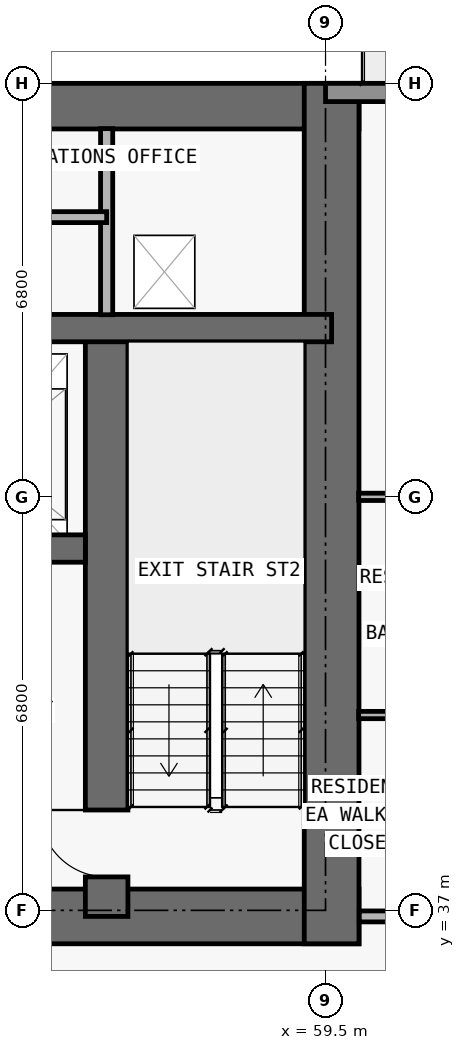
"""IFC4 building model, lengths in metres.
Left out: names, types, materials, properties, quantities, classifications, styles, units other than length and angle.
Written with IfcOpenShell. Run it as: python <this file> out.ifc"""

import sys

from ifc_helpers import new_model, si_unit, direction, frame, frame_2d, origin, place, context, subcontext, project, spatial, rectangle, extrude, element, fill, save


model = new_model("IFC4")
c1 = context("Model", 3, precision=1e-05, world=origin(), true_north=direction((0.0, 1.0)))
c2 = subcontext(c1, "Body", "Model", "MODEL_VIEW")
j1 = project(units=[si_unit("LENGTHUNIT", "METRE"), si_unit("PLANEANGLEUNIT", "RADIAN")], contexts=[c1])
p1 = place(None, origin())
s1 = spatial("IfcSite", under=j1, at=p1, CompositionType="ELEMENT")
p2 = place(p1, origin())
s2 = spatial("IfcBuilding", under=s1, at=p2, CompositionType="ELEMENT")
p3 = place(p2, frame((0.0, 0.0, 72.9)))
s3 = spatial("IfcBuildingStorey", under=s2, at=p3, CompositionType="ELEMENT", Elevation=72.9)
p4 = place(p3, frame((17.75, 36.9, 0.0), z_axis=(0.0, 0.0, 1.0), x_axis=(1.0, 0.0, 0.0)))
e1 = element("IfcWall", 1, at=p4, inside=s3, PredefinedType="SHEAR", context=c2, shape_type="SweptSolid", body=[
    extrude(rectangle(XDim=42.3, YDim=0.9, at=frame_2d((21.15, 0.0))), origin(), (0.0, 0.0, 1.0), 3.05),
])
p5 = place(p4, frame((14.55, 0.0, 0.0)))
e2 = element("IfcOpeningElement", 2, at=p5, cuts=e1, PredefinedType="OPENING", context=c2, shape_type="SweptSolid", body=[
    extrude(rectangle(XDim=1.1, YDim=2.15, at=frame_2d((0.55, 1.075))), frame((0.0, 0.46, 0.0), z_axis=(0.0, -1.0, 0.0), x_axis=(1.0, 0.0, 0.0)), (0.0, 0.0, 1.0), 0.92),
])
p6 = place(p4, frame((6.4, 0.0, 0.0)))
e3 = element("IfcOpeningElement", 3, at=p6, cuts=e1, PredefinedType="OPENING", context=c2, shape_type="SweptSolid", body=[
    extrude(rectangle(XDim=1.05, YDim=2.15, at=frame_2d((0.525, 1.075))), frame((0.0, 0.46, 0.0), z_axis=(0.0, -1.0, 0.0), x_axis=(1.0, 0.0, 0.0)), (0.0, 0.0, 1.0), 0.92),
])
p7 = place(p4, frame((34.9, 0.0, 0.0)))
e4 = element("IfcOpeningElement", 4, at=p7, cuts=e1, PredefinedType="OPENING", context=c2, shape_type="SweptSolid", body=[
    extrude(rectangle(XDim=1.05, YDim=2.15, at=frame_2d((0.525, 1.075))), frame((0.0, 0.46, 0.0), z_axis=(0.0, -1.0, 0.0), x_axis=(1.0, 0.0, 0.0)), (0.0, 0.0, 1.0), 0.92),
])
p8 = place(p4, frame((11.012, 0.0, 0.0)))
e5 = element("IfcOpeningElement", 5, at=p8, cuts=e1, PredefinedType="OPENING", context=c2, shape_type="SweptSolid", body=[
    extrude(rectangle(XDim=1.05, YDim=2.15, at=frame_2d((0.525, 1.075))), frame((0.0, 0.46, 0.0), z_axis=(0.0, -1.0, 0.0), x_axis=(1.0, 0.0, 0.0)), (0.0, 0.0, 1.0), 0.92),
])
p9 = place(p4, frame((24.25, 0.0, 0.0)))
e6 = element("IfcOpeningElement", 6, at=p9, cuts=e1, PredefinedType="OPENING", context=c2, shape_type="SweptSolid", body=[
    extrude(rectangle(XDim=1.05, YDim=2.15, at=frame_2d((0.525, 1.075))), frame((0.0, 0.46, 0.0), z_axis=(0.0, -1.0, 0.0), x_axis=(1.0, 0.0, 0.0)), (0.0, 0.0, 1.0), 0.92),
])
p10 = place(p3, frame((17.75, 50.225, 0.0), z_axis=(0.0, 0.0, 1.0), x_axis=(1.0, 0.0, 0.0)))
e7 = element("IfcWall", 7, at=p10, inside=s3, PredefinedType="SHEAR", context=c2, shape_type="SweptSolid", body=[
    extrude(rectangle(XDim=42.3, YDim=0.75, at=frame_2d((21.15, 0.0))), origin(), (0.0, 0.0, 1.0), 3.05),
])
p11 = place(p3, frame((59.6, 36.45, 0.0), z_axis=(0.0, 0.0, 1.0), x_axis=(0.0, 1.0, 0.0)))
e8 = element("IfcWall", 8, at=p11, inside=s3, PredefinedType="SHEAR", context=c2, shape_type="SweptSolid", body=[
    extrude(rectangle(XDim=14.15, YDim=0.9, at=frame_2d((7.075, 0.0))), origin(), (0.0, 0.0, 1.0), 3.05),
])
p12 = place(p3, frame((55.9, 36.9, 0.0), z_axis=(0.0, 0.0, 1.0), x_axis=(0.0, 1.0, 0.0)))
e9 = element("IfcWall", 9, at=p12, inside=s3, PredefinedType="SHEAR", context=c2, shape_type="SweptSolid", body=[
    extrude(rectangle(XDim=9.675, YDim=0.7, at=frame_2d((4.837, 0.0))), origin(), (0.0, 0.0, 1.0), 3.05),
])
p13 = place(p12, frame((0.65, 0.0, 0.0)))
e10 = element("IfcOpeningElement", 10, at=p13, cuts=e9, PredefinedType="OPENING", context=c2, shape_type="SweptSolid", body=[
    extrude(rectangle(XDim=1.1, YDim=2.15, at=frame_2d((0.55, 1.075))), frame((0.0, 0.36, 0.0), z_axis=(0.0, -1.0, 0.0), x_axis=(1.0, 0.0, 0.0)), (0.0, 0.0, 1.0), 0.72),
])
p14 = place(p3, frame((22.25, 42.95, 0.0), z_axis=(0.0, 0.0, 1.0), x_axis=(1.0, 0.0, 0.0)))
e11 = element("IfcWall", 11, at=p14, inside=s3, PredefinedType="SHEAR", context=c2, shape_type="SweptSolid", body=[
    extrude(rectangle(XDim=33.3, YDim=0.45, at=frame_2d((16.65, 0.0))), origin(), (0.0, 0.0, 1.0), 3.05),
])
p15 = place(p14, frame((1.05, 0.0, 0.0)))
e12 = element("IfcOpeningElement", 12, at=p15, cuts=e11, PredefinedType="OPENING", context=c2, shape_type="SweptSolid", body=[
    extrude(rectangle(XDim=1.2, YDim=2.2, at=frame_2d((0.6, 1.1))), frame((0.0, 0.235, 0.0), z_axis=(0.0, -1.0, 0.0), x_axis=(1.0, 0.0, 0.0)), (0.0, 0.0, 1.0), 0.47),
])
p16 = place(p14, frame((31.05, 0.0, 0.0)))
e13 = element("IfcOpeningElement", 13, at=p16, cuts=e11, PredefinedType="OPENING", context=c2, shape_type="SweptSolid", body=[
    extrude(rectangle(XDim=1.2, YDim=2.2, at=frame_2d((0.6, 1.1))), frame((0.0, 0.235, 0.0), z_axis=(0.0, -1.0, 0.0), x_axis=(1.0, 0.0, 0.0)), (0.0, 0.0, 1.0), 0.47),
])
p17 = place(p14, frame((13.5, 0.0, 0.0)))
e14 = element("IfcOpeningElement", 14, at=p17, cuts=e11, PredefinedType="OPENING", context=c2, shape_type="SweptSolid", body=[
    extrude(rectangle(XDim=1.1, YDim=2.2, at=frame_2d((0.55, 1.1))), frame((0.0, 0.235, 0.0), z_axis=(0.0, -1.0, 0.0), x_axis=(1.0, 0.0, 0.0)), (0.0, 0.0, 1.0), 0.47),
])
p18 = place(p14, frame((16.1, 0.0, 0.0)))
e15 = element("IfcOpeningElement", 15, at=p18, cuts=e11, PredefinedType="OPENING", context=c2, shape_type="SweptSolid", body=[
    extrude(rectangle(XDim=1.1, YDim=2.2, at=frame_2d((0.55, 1.1))), frame((0.0, 0.235, 0.0), z_axis=(0.0, -1.0, 0.0), x_axis=(1.0, 0.0, 0.0)), (0.0, 0.0, 1.0), 0.47),
])
p19 = place(p14, frame((18.7, 0.0, 0.0)))
e16 = element("IfcOpeningElement", 16, at=p19, cuts=e11, PredefinedType="OPENING", context=c2, shape_type="SweptSolid", body=[
    extrude(rectangle(XDim=1.1, YDim=2.2, at=frame_2d((0.55, 1.1))), frame((0.0, 0.235, 0.0), z_axis=(0.0, -1.0, 0.0), x_axis=(1.0, 0.0, 0.0)), (0.0, 0.0, 1.0), 0.47),
])
p20 = place(p14, frame((3.625, 0.0, 0.0)))
e17 = element("IfcOpeningElement", 17, at=p20, cuts=e11, PredefinedType="OPENING", context=c2, shape_type="SweptSolid", body=[
    extrude(rectangle(XDim=1.05, YDim=2.15, at=frame_2d((0.525, 1.075))), frame((0.0, 0.235, 0.0), z_axis=(0.0, -1.0, 0.0), x_axis=(1.0, 0.0, 0.0)), (0.0, 0.0, 1.0), 0.47),
])
p21 = place(p14, frame((28.675, 0.0, 0.0)))
e18 = element("IfcOpeningElement", 18, at=p21, cuts=e11, PredefinedType="OPENING", context=c2, shape_type="SweptSolid", body=[
    extrude(rectangle(XDim=1.05, YDim=2.15, at=frame_2d((0.525, 1.075))), frame((0.0, 0.235, 0.0), z_axis=(0.0, -1.0, 0.0), x_axis=(1.0, 0.0, 0.0)), (0.0, 0.0, 1.0), 0.47),
])
p22 = place(p3, frame((18.2, 46.575, 0.0), z_axis=(0.0, 0.0, 1.0), x_axis=(1.0, 0.0, 0.0)))
e19 = element("IfcWall", 19, at=p22, inside=s3, PredefinedType="SHEAR", context=c2, shape_type="SweptSolid", body=[
    extrude(rectangle(XDim=41.4, YDim=0.45, at=frame_2d((20.7, 0.0))), origin(), (0.0, 0.0, 1.0), 3.05),
])
p23 = place(p22, frame((7.675, 0.0, 0.0)))
e20 = element("IfcOpeningElement", 20, at=p23, cuts=e19, PredefinedType="OPENING", context=c2, shape_type="SweptSolid", body=[
    extrude(rectangle(XDim=1.05, YDim=2.15, at=frame_2d((0.525, 1.075))), frame((0.0, 0.235, 0.0), z_axis=(0.0, -1.0, 0.0), x_axis=(1.0, 0.0, 0.0)), (0.0, 0.0, 1.0), 0.47),
])
p24 = place(p22, frame((32.725, 0.0, 0.0)))
e21 = element("IfcOpeningElement", 21, at=p24, cuts=e19, PredefinedType="OPENING", context=c2, shape_type="SweptSolid", body=[
    extrude(rectangle(XDim=1.05, YDim=2.15, at=frame_2d((0.525, 1.075))), frame((0.0, 0.235, 0.0), z_axis=(0.0, -1.0, 0.0), x_axis=(1.0, 0.0, 0.0)), (0.0, 0.0, 1.0), 0.47),
])
p25 = place(p3, frame((59.5, 50.45, 0.0), z_axis=(0.0, 0.0, 1.0), x_axis=(1.0, 0.0, 0.0)))
e22 = element("IfcWall", 22, at=p25, inside=s3, PredefinedType="STANDARD", context=c2, shape_type="SweptSolid", body=[
    extrude(rectangle(XDim=13.2, YDim=0.3, at=frame_2d((6.6, 0.0))), origin(), (0.0, 0.0, 1.0), 3.05),
])
p26 = place(p25, frame((5.6, 0.0, 0.0)))
e23 = element("IfcOpeningElement", 23, at=p26, cuts=e22, PredefinedType="OPENING", context=c2, shape_type="SweptSolid", body=[
    extrude(rectangle(XDim=2.0, YDim=2.3, at=frame_2d((1.0, 1.15))), frame((0.0, 0.16, 0.0), z_axis=(0.0, -1.0, 0.0), x_axis=(1.0, 0.0, 0.0)), (0.0, 0.0, 1.0), 0.32),
])
p27 = place(p3, frame((55.9, 46.795, 0.0), z_axis=(0.0, 0.0, 1.0), x_axis=(0.0, 1.0, 0.0)))
e24 = element("IfcWall", 24, at=p27, inside=s3, PredefinedType="PARTITIONING", context=c2, shape_type="SweptSolid", body=[
    extrude(rectangle(XDim=3.06, YDim=0.2, at=frame_2d((1.53, 0.0))), origin(), (0.0, 0.0, 1.0), 3.05),
])
p28 = place(p3, frame((60.055, 36.9, 0.0), z_axis=(0.0, 0.0, 1.0), x_axis=(1.0, 0.0, 0.0)))
e25 = element("IfcWall", 25, at=p28, inside=s3, PredefinedType="PARTITIONING", context=c2, shape_type="SweptSolid", body=[
    extrude(rectangle(XDim=12.645, YDim=0.18, at=frame_2d((6.323, 0.0))), origin(), (0.0, 0.0, 1.0), 3.05),
])
p29 = place(p28, frame((4.52, 0.0, 0.0)))
e26 = element("IfcOpeningElement", 26, at=p29, cuts=e25, PredefinedType="OPENING", context=c2, shape_type="SweptSolid", body=[
    extrude(rectangle(XDim=1.0, YDim=2.2, at=frame_2d((0.5, 1.1))), frame((0.0, 0.1, 0.0), z_axis=(0.0, -1.0, 0.0), x_axis=(1.0, 0.0, 0.0)), (0.0, 0.0, 1.0), 0.2),
])
p30 = place(p3, frame((60.045, 40.212, 0.0), z_axis=(0.0, 0.0, 1.0), x_axis=(1.0, 0.0, 0.0)))
e27 = element("IfcWall", 27, at=p30, inside=s3, PredefinedType="PARTITIONING", context=c2, shape_type="SweptSolid", body=[
    extrude(rectangle(XDim=2.205, YDim=0.12, at=frame_2d((1.103, 0.0))), origin(), (0.0, 0.0, 1.0), 3.05),
])
p31 = place(p3, frame((60.045, 43.8, 0.0), z_axis=(0.0, 0.0, 1.0), x_axis=(1.0, 0.0, 0.0)))
e28 = element("IfcWall", 28, at=p31, inside=s3, PredefinedType="PARTITIONING", context=c2, shape_type="SweptSolid", body=[
    extrude(rectangle(XDim=15.96, YDim=0.12, at=frame_2d((7.98, 0.0))), origin(), (0.0, 0.0, 1.0), 2.339),
])
p32 = place(p31, frame((9.805, 0.0, 0.0)))
e29 = element("IfcOpeningElement", 29, at=p32, cuts=e28, PredefinedType="OPENING", context=c2, shape_type="SweptSolid", body=[
    extrude(rectangle(XDim=0.9, YDim=2.15, at=frame_2d((0.45, 1.075))), frame((0.0, 0.07, 0.0), z_axis=(0.0, -1.0, 0.0), x_axis=(1.0, 0.0, 0.0)), (0.0, 0.0, 1.0), 0.14),
])
p33 = place(p31, frame((4.58, 0.0, 0.0)))
e30 = element("IfcOpeningElement", 30, at=p33, cuts=e28, PredefinedType="OPENING", context=c2, shape_type="SweptSolid", body=[
    extrude(rectangle(XDim=0.9, YDim=2.15, at=frame_2d((0.45, 1.075))), frame((0.0, 0.07, 0.0), z_axis=(0.0, -1.0, 0.0), x_axis=(1.0, 0.0, 0.0)), (0.0, 0.0, 1.0), 0.14),
])
p34 = place(p31, frame((0.677, 0.0, 0.0)))
e31 = element("IfcOpeningElement", 31, at=p34, cuts=e28, PredefinedType="OPENING", context=c2, shape_type="SweptSolid", body=[
    extrude(rectangle(XDim=0.85, YDim=2.1, at=frame_2d((0.425, 1.05))), frame((0.0, 0.07, 0.0), z_axis=(0.0, -1.0, 0.0), x_axis=(1.0, 0.0, 0.0)), (0.0, 0.0, 1.0), 0.14),
])
p35 = place(p3, frame((21.9, 48.4, 0.0), z_axis=(0.0, 0.0, 1.0), x_axis=(1.0, 0.0, 0.0)))
e32 = element("IfcWall", 32, at=p35, inside=s3, PredefinedType="PARTITIONING", context=c2, shape_type="SweptSolid", body=[
    extrude(rectangle(XDim=34.0, YDim=0.18, at=frame_2d((17.0, 0.0))), origin(), (0.0, 0.0, 1.0), 3.05),
])
p36 = place(p35, frame((8.0, 0.0, 0.0)))
e33 = element("IfcOpeningElement", 33, at=p36, cuts=e32, PredefinedType="OPENING", context=c2, shape_type="SweptSolid", body=[
    extrude(rectangle(XDim=1.0, YDim=2.2, at=frame_2d((0.5, 1.1))), frame((0.0, 0.1, 0.0), z_axis=(0.0, -1.0, 0.0), x_axis=(1.0, 0.0, 0.0)), (0.0, 0.0, 1.0), 0.2),
])
p37 = place(p35, frame((25.0, 0.0, 0.0)))
e34 = element("IfcOpeningElement", 34, at=p37, cuts=e32, PredefinedType="OPENING", context=c2, shape_type="SweptSolid", body=[
    extrude(rectangle(XDim=1.0, YDim=2.2, at=frame_2d((0.5, 1.1))), frame((0.0, 0.1, 0.0), z_axis=(0.0, -1.0, 0.0), x_axis=(1.0, 0.0, 0.0)), (0.0, 0.0, 1.0), 0.2),
])
p38 = place(p13, origin())
e35 = element("IfcDoor", 35, at=p38, inside=s3, OperationType="SINGLE_SWING_RIGHT", PredefinedType="DOOR", context=c2, shape_type="SweptSolid", body=[
    extrude(rectangle(XDim=1.1, YDim=2.15, at=frame_2d((0.55, 1.075))), frame((0.0, 0.025, 0.0), z_axis=(0.0, -1.0, 0.0), x_axis=(1.0, 0.0, 0.0)), (0.0, 0.0, 1.0), 0.05),
])
fill(e10, e35)
save(model, sys.argv[1])
